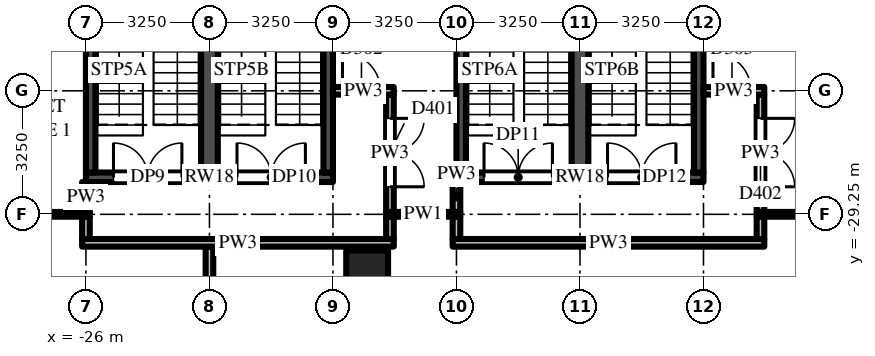
"""IFC4 building model, lengths in metres.
Left out: names, types, materials, properties, quantities, classifications, styles, units other than length and angle.
Written with IfcOpenShell. Run it as: python <this file> out.ifc"""

import sys

from ifc_helpers import new_model, si_unit, direction, frame, frame_2d, origin, origin_2d, place, context, subcontext, project, spatial, rectangle, extrude, source, transform, mapped, element, fill, save


model = new_model("IFC4")
c1 = context("Model", 3, precision=1e-05, world=origin(), true_north=direction((0.0, 1.0)))
c2 = subcontext(c1, "Body", "Model", "MODEL_VIEW")
j1 = project(units=[si_unit("LENGTHUNIT", "METRE"), si_unit("PLANEANGLEUNIT", "RADIAN")], contexts=[c1])
p1 = place(None, origin())
s1 = spatial("IfcSite", under=j1, at=p1, CompositionType="ELEMENT")
p2 = place(p1, origin())
s2 = spatial("IfcBuilding", under=s1, at=p2, CompositionType="ELEMENT")
p3 = place(p2, frame((0.0, 0.0, 14.0)))
s3 = spatial("IfcBuildingStorey", under=s2, at=p3, CompositionType="ELEMENT", Elevation=14.0)
m1 = source(origin(), c2, "Body", "SweptSolid", [
    extrude(rectangle(XDim=1.1, YDim=1.1, at=origin_2d()), origin(), (0.0, 0.0, 1.0), 5.0),
])
p4 = place(p3, frame((-18.6, -30.75, 0.0), z_axis=(0.0, 0.0, 1.0), x_axis=(1.0, 0.0, 0.0)))
e1 = element("IfcColumn", 1, at=p4, inside=s3, PredefinedType="COLUMN", context=c2, shape_type="MappedRepresentation", body=[
    mapped(m1, transform((0.0, 0.0, 0.0))),
])
m2 = source(origin(), c2, "Body", "SweptSolid", [
    extrude(rectangle(XDim=6.5, YDim=0.25, at=frame_2d((3.25, 0.0))), origin(), (0.0, 0.0, 1.0), 4.7),
])
p5 = place(p3, frame((-26.0, -28.275, 0.0), z_axis=(0.0, 0.0, 1.0), x_axis=(1.0, 0.0, 0.0)))
e2 = element("IfcWall", 2, at=p5, inside=s3, PredefinedType="SHEAR", context=c2, shape_type="MappedRepresentation", body=[
    mapped(m2, transform((0.0, 0.0, 0.0))),
])
m3 = source(origin(), c2, "Body", "SweptSolid", [
    extrude(rectangle(XDim=1.8, YDim=2.1, at=frame_2d((0.9, 1.05))), frame((0.0, 0.135, 0.0), z_axis=(0.0, -1.0, 0.0), x_axis=(1.0, 0.0, 0.0)), (0.0, 0.0, 1.0), 0.27),
])
p6 = place(p5, frame((0.725, 0.0, 0.0)))
e3 = element("IfcOpeningElement", 3, at=p6, cuts=e2, PredefinedType="OPENING", context=c2, shape_type="MappedRepresentation", body=[
    mapped(m3, transform((0.0, 0.0, 0.0))),
])
p7 = place(p5, frame((3.975, 0.0, 0.0)))
e4 = element("IfcOpeningElement", 4, at=p7, cuts=e2, PredefinedType="OPENING", context=c2, shape_type="MappedRepresentation", body=[
    mapped(m3, transform((0.0, 0.0, 0.0))),
])
m4 = source(origin(), c2, "Body", "SweptSolid", [
    extrude(rectangle(XDim=8.3, YDim=0.25, at=frame_2d((4.15, 0.0))), origin(), (0.0, 0.0, 1.0), 4.7),
])
for number, where, z_axis, x_axis in (
    (5, (-25.875, -28.15, 0.0), (0.0, 0.0, 1.0), (0.0, 1.0, 0.0)),
    (6, (-19.625, -28.15, 0.0), (0.0, 0.0, 1.0), (0.0, 1.0, 0.0)),
):
    element("IfcWall", number, at=place(p3, frame(where, z_axis=z_axis, x_axis=x_axis)), inside=s3, PredefinedType="SHEAR", context=c2, shape_type="MappedRepresentation", body=[
        mapped(m4, transform((0.0, 0.0, 0.0))),
    ])
m5 = source(origin(), c2, "Body", "SweptSolid", [
    extrude(rectangle(XDim=8.3, YDim=0.44, at=frame_2d((4.15, 0.0))), origin(), (0.0, 0.0, 1.0), 4.7),
])
p8 = place(p3, frame((-22.75, -28.15, 0.0), z_axis=(0.0, 0.0, 1.0), x_axis=(0.0, 1.0, 0.0)))
e7 = element("IfcWall", 7, at=p8, inside=s3, PredefinedType="SHEAR", context=c2, shape_type="MappedRepresentation", body=[
    mapped(m5, transform((0.0, 0.0, 0.0))),
])
p9 = place(p3, frame((-16.25, -28.275, 0.0), z_axis=(0.0, 0.0, 1.0), x_axis=(1.0, 0.0, 0.0)))
e8 = element("IfcWall", 8, at=p9, inside=s3, PredefinedType="SHEAR", context=c2, shape_type="MappedRepresentation", body=[
    mapped(m2, transform((0.0, 0.0, 0.0))),
])
p10 = place(p9, frame((0.725, 0.0, 0.0)))
e9 = element("IfcOpeningElement", 9, at=p10, cuts=e8, PredefinedType="OPENING", context=c2, shape_type="MappedRepresentation", body=[
    mapped(m3, transform((0.0, 0.0, 0.0))),
])
p11 = place(p9, frame((3.975, 0.0, 0.0)))
e10 = element("IfcOpeningElement", 10, at=p11, cuts=e8, PredefinedType="OPENING", context=c2, shape_type="MappedRepresentation", body=[
    mapped(m3, transform((0.0, 0.0, 0.0))),
])
for number, where, z_axis, x_axis in (
    (11, (-16.125, -28.15, 0.0), (0.0, 0.0, 1.0), (0.0, 1.0, 0.0)),
    (12, (-9.875, -28.15, 0.0), (0.0, 0.0, 1.0), (0.0, 1.0, 0.0)),
):
    element("IfcWall", number, at=place(p3, frame(where, z_axis=z_axis, x_axis=x_axis)), inside=s3, PredefinedType="SHEAR", context=c2, shape_type="MappedRepresentation", body=[
        mapped(m4, transform((0.0, 0.0, 0.0))),
    ])
p12 = place(p3, frame((-13.0, -28.15, 0.0), z_axis=(0.0, 0.0, 1.0), x_axis=(0.0, 1.0, 0.0)))
e13 = element("IfcWall", 13, at=p12, inside=s3, PredefinedType="SHEAR", context=c2, shape_type="MappedRepresentation", body=[
    mapped(m5, transform((0.0, 0.0, 0.0))),
])
m6 = source(origin(), c2, "Body", "SweptSolid", [
    extrude(rectangle(XDim=0.788, YDim=0.2, at=frame_2d((0.394, 0.0))), origin(), (0.0, 0.0, 1.0), 4.7),
])
p13 = place(p3, frame((-26.0, -29.188, 0.0), z_axis=(0.0, 0.0, 1.0), x_axis=(0.0, 1.0, 0.0)))
e14 = element("IfcWall", 14, at=p13, inside=s3, PredefinedType="PARTITIONING", context=c2, shape_type="MappedRepresentation", body=[
    mapped(m6, transform((0.0, 0.0, 0.0))),
])
m7 = source(origin(), c2, "Body", "SweptSolid", [
    extrude(rectangle(XDim=0.587, YDim=0.2, at=frame_2d((0.294, 0.0))), origin(), (0.0, 0.0, 1.0), 4.7),
])
p14 = place(p3, frame((-26.0, -29.9, 0.0), z_axis=(0.0, 0.0, 1.0), x_axis=(0.0, 1.0, 0.0)))
e15 = element("IfcWall", 15, at=p14, inside=s3, PredefinedType="PARTITIONING", context=c2, shape_type="MappedRepresentation", body=[
    mapped(m7, transform((0.0, 0.0, 0.0))),
])
m8 = source(origin(), c2, "Body", "SweptSolid", [
    extrude(rectangle(XDim=8.7, YDim=0.2, at=frame_2d((4.35, 0.0))), origin(), (0.0, 0.0, 1.0), 3.762),
])
p15 = place(p3, frame((-22.75, -38.8, 0.0), z_axis=(0.0, 0.0, 1.0), x_axis=(0.0, 1.0, 0.0)))
e16 = element("IfcWall", 16, at=p15, inside=s3, PredefinedType="PARTITIONING", context=c2, shape_type="MappedRepresentation", body=[
    mapped(m8, transform((0.0, 0.0, 0.0))),
])
m9 = source(origin(), c2, "Body", "SweptSolid", [
    extrude(rectangle(XDim=3.087, YDim=0.2, at=frame_2d((1.544, 0.0))), origin(), (0.0, 0.0, 1.0), 4.274),
])
p16 = place(p3, frame((-18.0, -26.1, 0.0), z_axis=(0.0, 0.0, 1.0), x_axis=(0.0, -1.0, 0.0)))
e17 = element("IfcWall", 17, at=p16, inside=s3, PredefinedType="PARTITIONING", context=c2, shape_type="MappedRepresentation", body=[
    mapped(m9, transform((0.0, 0.0, 0.0))),
])
m10 = source(origin(), c2, "Body", "SweptSolid", [
    extrude(rectangle(XDim=1.8, YDim=2.1, at=frame_2d((0.9, 1.05))), frame((0.0, 0.11, 0.0), z_axis=(0.0, -1.0, 0.0), x_axis=(1.0, 0.0, 0.0)), (0.0, 0.0, 1.0), 0.22),
])
p17 = place(p16, frame((0.625, 0.0, 0.0)))
e18 = element("IfcOpeningElement", 18, at=p17, cuts=e17, PredefinedType="OPENING", context=c2, shape_type="MappedRepresentation", body=[
    mapped(m10, transform((0.0, 0.0, 0.0))),
])
p18 = place(p3, frame((-18.0, -29.312, 0.0), z_axis=(0.0, 0.0, 1.0), x_axis=(0.0, -1.0, 0.0)))
e19 = element("IfcWall", 19, at=p18, inside=s3, PredefinedType="PARTITIONING", context=c2, shape_type="MappedRepresentation", body=[
    mapped(m7, transform((0.0, 0.0, 0.0))),
])
p19 = place(p3, frame((-16.25, -29.188, 0.0), z_axis=(0.0, 0.0, 1.0), x_axis=(0.0, 1.0, 0.0)))
e20 = element("IfcWall", 20, at=p19, inside=s3, PredefinedType="PARTITIONING", context=c2, shape_type="MappedRepresentation", body=[
    mapped(m6, transform((0.0, 0.0, 0.0))),
])
p20 = place(p3, frame((-16.25, -29.312, 0.0), z_axis=(0.0, 0.0, 1.0), x_axis=(0.0, -1.0, 0.0)))
e21 = element("IfcWall", 21, at=p20, inside=s3, PredefinedType="PARTITIONING", context=c2, shape_type="MappedRepresentation", body=[
    mapped(m7, transform((0.0, 0.0, 0.0))),
])
p21 = place(p3, frame((-8.25, -26.1, 0.0), z_axis=(0.0, 0.0, 1.0), x_axis=(0.0, -1.0, 0.0)))
e22 = element("IfcWall", 22, at=p21, inside=s3, PredefinedType="PARTITIONING", context=c2, shape_type="MappedRepresentation", body=[
    mapped(m9, transform((0.0, 0.0, 0.0))),
])
p22 = place(p21, frame((0.625, 0.0, 0.0)))
e23 = element("IfcOpeningElement", 23, at=p22, cuts=e22, PredefinedType="OPENING", context=c2, shape_type="MappedRepresentation", body=[
    mapped(m10, transform((0.0, 0.0, 0.0))),
])
p23 = place(p3, frame((-8.25, -29.9, 0.0), z_axis=(0.0, 0.0, 1.0), x_axis=(0.0, 1.0, 0.0)))
e24 = element("IfcWall", 24, at=p23, inside=s3, PredefinedType="PARTITIONING", context=c2, shape_type="MappedRepresentation", body=[
    mapped(m7, transform((0.0, 0.0, 0.0))),
])
m11 = source(origin(), c2, "Body", "SweptSolid", [
    extrude(rectangle(XDim=8.2, YDim=0.2, at=frame_2d((4.1, 0.0))), origin(), (0.0, 0.0, 1.0), 3.762),
])
p24 = place(p3, frame((-17.9, -30.0, 0.0), z_axis=(0.0, 0.0, 1.0), x_axis=(-1.0, 0.0, 0.0)))
e25 = element("IfcWall", 25, at=p24, inside=s3, PredefinedType="PARTITIONING", context=c2, shape_type="MappedRepresentation", body=[
    mapped(m11, transform((0.0, 0.0, 0.0))),
])
m12 = source(origin(), c2, "Body", "SweptSolid", [
    extrude(rectangle(XDim=8.2, YDim=0.2, at=frame_2d((4.1, 0.0))), origin(), (0.0, 0.0, 1.0), 4.7),
])
p25 = place(p3, frame((-8.15, -30.0, 0.0), z_axis=(0.0, 0.0, 1.0), x_axis=(-1.0, 0.0, 0.0)))
e26 = element("IfcWall", 26, at=p25, inside=s3, PredefinedType="PARTITIONING", context=c2, shape_type="MappedRepresentation", body=[
    mapped(m12, transform((0.0, 0.0, 0.0))),
])
m13 = source(origin(), c2, "Body", "SweptSolid", [
    extrude(rectangle(XDim=3.413, YDim=0.125, at=frame_2d((1.706, 0.0))), origin(), (0.0, 0.0, 1.0), 4.7),
])
p26 = place(p3, frame((-25.9, -29.25, 0.0), z_axis=(0.0, 0.0, 1.0), x_axis=(-1.0, 0.0, 0.0)))
e27 = element("IfcWall", 27, at=p26, inside=s3, PredefinedType="PARTITIONING", context=c2, shape_type="MappedRepresentation", body=[
    mapped(m13, transform((0.0, 0.0, 0.0))),
])
m14 = source(origin(), c2, "Body", "SweptSolid", [
    extrude(rectangle(XDim=1.2, YDim=2.1, at=frame_2d((0.6, 1.05))), frame((0.0, 0.073, 0.0), z_axis=(0.0, -1.0, 0.0), x_axis=(1.0, 0.0, 0.0)), (0.0, 0.0, 1.0), 0.145),
])
p27 = place(p26, frame((1.8, 0.0, 0.0)))
e28 = element("IfcOpeningElement", 28, at=p27, cuts=e27, PredefinedType="OPENING", context=c2, shape_type="MappedRepresentation", body=[
    mapped(m14, transform((0.0, 0.0, 0.0))),
])
m15 = source(origin(), c2, "Body", "SweptSolid", [
    extrude(rectangle(XDim=1.95, YDim=0.125, at=frame_2d((0.975, 0.0))), origin(), (0.0, 0.0, 1.0), 4.7),
])
p28 = place(p3, frame((-16.15, -29.25, 0.0), z_axis=(0.0, 0.0, 1.0), x_axis=(-1.0, 0.0, 0.0)))
e29 = element("IfcWall", 29, at=p28, inside=s3, PredefinedType="PARTITIONING", context=c2, shape_type="MappedRepresentation", body=[
    mapped(m15, transform((0.0, 0.0, 0.0))),
])
p29 = place(p3, frame((-3.15, -29.25, 0.0), z_axis=(0.0, 0.0, 1.0), x_axis=(-1.0, 0.0, 0.0)))
e30 = element("IfcWall", 30, at=p29, inside=s3, PredefinedType="PARTITIONING", context=c2, shape_type="SweptSolid", body=[
    extrude(rectangle(XDim=5.2, YDim=0.125, at=frame_2d((2.6, 0.0))), origin(), (0.0, 0.0, 1.0), 3.918),
])
m16 = source(origin(), c2, "Body", "SweptSolid", [
    extrude(rectangle(XDim=1.6, YDim=0.2, at=frame_2d((0.8, 0.0))), origin(), (0.0, 0.0, 1.0), 3.762),
])
p30 = place(p3, frame((-19.5, -26.0, 0.0), z_axis=(0.0, 0.0, 1.0), x_axis=(1.0, 0.0, 0.0)))
e31 = element("IfcWall", 31, at=p30, inside=s3, PredefinedType="PARTITIONING", context=c2, shape_type="MappedRepresentation", body=[
    mapped(m16, transform((0.0, 0.0, 0.0))),
])
m17 = source(origin(), c2, "Body", "SweptSolid", [
    extrude(rectangle(XDim=1.0, YDim=2.1, at=frame_2d((0.5, 1.05))), frame((0.0, 0.11, 0.0), z_axis=(0.0, -1.0, 0.0), x_axis=(1.0, 0.0, 0.0)), (0.0, 0.0, 1.0), 0.22),
])
p31 = place(p30, frame((0.25, 0.0, 0.0)))
e32 = element("IfcOpeningElement", 32, at=p31, cuts=e31, PredefinedType="OPENING", context=c2, shape_type="MappedRepresentation", body=[
    mapped(m17, transform((0.0, 0.0, 0.0))),
])
m18 = source(origin(), c2, "Body", "SweptSolid", [
    extrude(rectangle(XDim=1.6, YDim=0.2, at=frame_2d((0.8, 0.0))), origin(), (0.0, 0.0, 1.0), 4.7),
])
p32 = place(p3, frame((-9.75, -26.0, 0.0), z_axis=(0.0, 0.0, 1.0), x_axis=(1.0, 0.0, 0.0)))
e33 = element("IfcWall", 33, at=p32, inside=s3, PredefinedType="PARTITIONING", context=c2, shape_type="MappedRepresentation", body=[
    mapped(m18, transform((0.0, 0.0, 0.0))),
])
p33 = place(p32, frame((0.25, 0.0, 0.0)))
e34 = element("IfcOpeningElement", 34, at=p33, cuts=e33, PredefinedType="OPENING", context=c2, shape_type="MappedRepresentation", body=[
    mapped(m17, transform((0.0, 0.0, 0.0))),
])
m19 = source(origin(), c2, "Body", "SweptSolid", [
    extrude(rectangle(XDim=1.8, YDim=2.1, at=frame_2d((0.9, 1.05))), frame((0.0, 0.025, 0.0), z_axis=(0.0, -1.0, 0.0), x_axis=(1.0, 0.0, 0.0)), (0.0, 0.0, 1.0), 0.05),
])
p34 = place(p6, origin())
e35 = element("IfcDoor", 35, at=p34, inside=s3, OperationType="DOUBLE_DOOR_SINGLE_SWING", PredefinedType="DOOR", context=c2, shape_type="MappedRepresentation", body=[
    mapped(m19, transform((0.0, 0.0, 0.0))),
])
fill(e3, e35)
p35 = place(p7, origin())
e36 = element("IfcDoor", 36, at=p35, inside=s3, OperationType="DOUBLE_DOOR_SINGLE_SWING", PredefinedType="DOOR", context=c2, shape_type="MappedRepresentation", body=[
    mapped(m19, transform((0.0, 0.0, 0.0))),
])
fill(e4, e36)
p36 = place(p10, origin())
e37 = element("IfcDoor", 37, at=p36, inside=s3, OperationType="DOUBLE_DOOR_SINGLE_SWING", PredefinedType="DOOR", context=c2, shape_type="MappedRepresentation", body=[
    mapped(m19, transform((0.0, 0.0, 0.0))),
])
fill(e9, e37)
p37 = place(p11, origin())
e38 = element("IfcDoor", 38, at=p37, inside=s3, OperationType="DOUBLE_DOOR_SINGLE_SWING", PredefinedType="DOOR", context=c2, shape_type="MappedRepresentation", body=[
    mapped(m19, transform((0.0, 0.0, 0.0))),
])
fill(e10, e38)
p38 = place(p17, origin())
e39 = element("IfcDoor", 39, at=p38, inside=s3, OperationType="DOUBLE_DOOR_SINGLE_SWING", PredefinedType="DOOR", context=c2, shape_type="MappedRepresentation", body=[
    mapped(m19, transform((0.0, 0.0, 0.0))),
])
fill(e18, e39)
p39 = place(p22, origin())
e40 = element("IfcDoor", 40, at=p39, inside=s3, OperationType="DOUBLE_DOOR_SINGLE_SWING", PredefinedType="DOOR", context=c2, shape_type="MappedRepresentation", body=[
    mapped(m19, transform((0.0, 0.0, 0.0))),
])
fill(e23, e40)
m20 = source(origin(), c2, "Body", "SweptSolid", [
    extrude(rectangle(XDim=1.0, YDim=2.1, at=frame_2d((0.5, 1.05))), frame((0.0, 0.025, 0.0), z_axis=(0.0, -1.0, 0.0), x_axis=(1.0, 0.0, 0.0)), (0.0, 0.0, 1.0), 0.05),
])
p40 = place(p31, origin())
e41 = element("IfcDoor", 41, at=p40, inside=s3, OperationType="SINGLE_SWING_LEFT", PredefinedType="DOOR", context=c2, shape_type="MappedRepresentation", body=[
    mapped(m20, transform((0.0, 0.0, 0.0))),
])
fill(e32, e41)
p41 = place(p33, origin())
e42 = element("IfcDoor", 42, at=p41, inside=s3, OperationType="SINGLE_SWING_LEFT", PredefinedType="DOOR", context=c2, shape_type="MappedRepresentation", body=[
    mapped(m20, transform((0.0, 0.0, 0.0))),
])
fill(e34, e42)
save(model, sys.argv[1])
